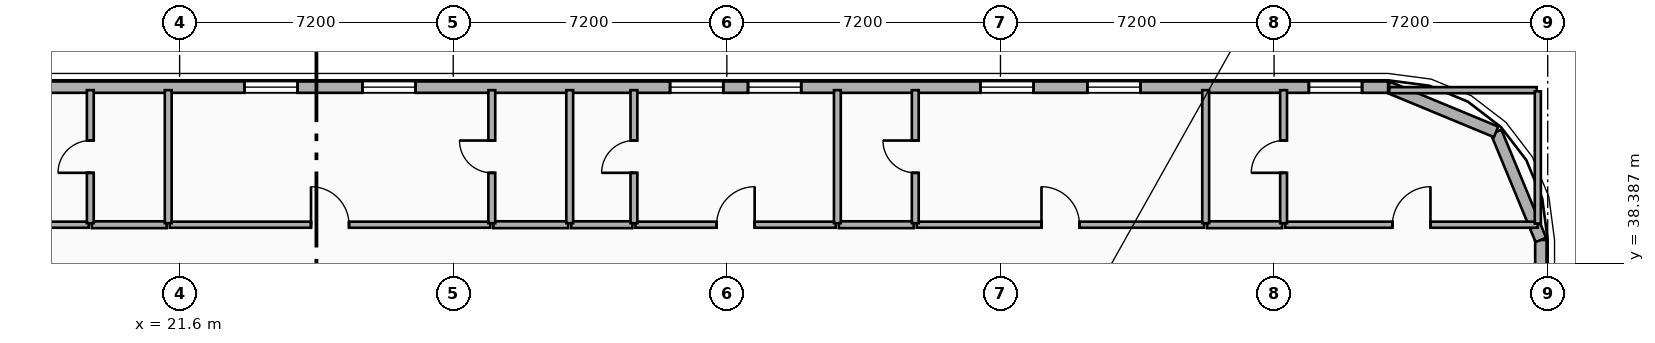
"""IFC4 building model, lengths in metres.
Left out: names, types, materials, properties, quantities, classifications, styles, units other than length and angle.
Written with IfcOpenShell. Run it as: python <this file> out.ifc"""

import sys

from ifc_helpers import new_model, si_unit, direction, frame, frame_2d, origin, place, context, subcontext, project, spatial, rectangle, extrude, element, fill, save


model = new_model("IFC4")
c1 = context("Model", 3, precision=1e-05, world=origin(), true_north=direction((0.0, 1.0)))
c2 = subcontext(c1, "Body", "Model", "MODEL_VIEW")
j1 = project(units=[si_unit("LENGTHUNIT", "METRE"), si_unit("PLANEANGLEUNIT", "RADIAN")], contexts=[c1])
p1 = place(None, origin())
s1 = spatial("IfcSite", under=j1, at=p1, CompositionType="ELEMENT")
p2 = place(p1, origin())
s2 = spatial("IfcBuilding", under=s1, at=p2, CompositionType="ELEMENT")
p3 = place(p2, frame((0.0, 0.0, 82.8)))
s3 = spatial("IfcBuildingStorey", under=s2, at=p3, CompositionType="ELEMENT", Elevation=82.8)
p4 = place(p3, frame((57.42, 39.0, 0.0), z_axis=(0.0, 0.0, 1.0), x_axis=(0.0, -1.0, 0.0)))
e1 = element("IfcWall", 1, at=p4, inside=s3, PredefinedType="SOLIDWALL", context=c2, shape_type="SweptSolid", body=[
    extrude(rectangle(XDim=18.0, YDim=0.3, at=frame_2d((9.0, 0.0))), origin(), (0.0, 0.0, 1.0), 3.24),
])
p5 = place(p4, frame((8.882, 0.0, 0.48)))
e2 = element("IfcOpeningElement", 2, at=p5, cuts=e1, PredefinedType="OPENING", context=c2, shape_type="SweptSolid", body=[
    extrude(rectangle(XDim=1.4, YDim=1.8, at=frame_2d((0.7, 0.9))), frame((0.0, 0.16, 0.0), z_axis=(0.0, -1.0, 0.0), x_axis=(1.0, 0.0, 0.0)), (0.0, 0.0, 1.0), 0.32),
])
p6 = place(p4, frame((3.621, 0.0, 0.48)))
e3 = element("IfcOpeningElement", 3, at=p6, cuts=e1, PredefinedType="OPENING", context=c2, shape_type="SweptSolid", body=[
    extrude(rectangle(XDim=1.4, YDim=1.8, at=frame_2d((0.7, 0.9))), frame((0.0, 0.16, 0.0), z_axis=(0.0, -1.0, 0.0), x_axis=(1.0, 0.0, 0.0)), (0.0, 0.0, 1.0), 0.32),
])
p7 = place(p4, frame((16.28, 0.0, 0.65)))
e4 = element("IfcOpeningElement", 4, at=p7, cuts=e1, PredefinedType="OPENING", context=c2, shape_type="SweptSolid", body=[
    extrude(rectangle(XDim=1.4, YDim=1.8, at=frame_2d((0.7, 0.9))), frame((0.0, 0.16, 0.0), z_axis=(0.0, -1.0, 0.0), x_axis=(1.0, 0.0, 0.0)), (0.0, 0.0, 1.0), 0.32),
])
p8 = place(p3, frame((56.243, 41.843, 0.0), z_axis=(0.0, 0.0, 1.0), x_axis=(0.382636798336, -0.92389884758, 0.0)))
e5 = element("IfcWall", 5, at=p8, inside=s3, PredefinedType="SOLIDWALL", context=c2, shape_type="SweptSolid", body=[
    extrude(rectangle(XDim=3.077, YDim=0.3, at=frame_2d((1.538, 0.0))), origin(), (0.0, 0.0, 1.0), 3.24),
])
p9 = place(p3, frame((53.4, 43.02, 0.0), z_axis=(0.0, 0.0, 1.0), x_axis=(0.923882414032, -0.382676475685, 0.0)))
e6 = element("IfcWall", 6, at=p9, inside=s3, PredefinedType="SOLIDWALL", context=c2, shape_type="SweptSolid", body=[
    extrude(rectangle(XDim=3.077, YDim=0.3, at=frame_2d((1.539, 0.0))), origin(), (0.0, 0.0, 1.0), 3.24),
])
p10 = place(p3, frame((4.2, 43.02, 0.0), z_axis=(0.0, 0.0, 1.0), x_axis=(1.0, 0.0, 0.0)))
e7 = element("IfcWall", 7, at=p10, inside=s3, PredefinedType="SOLIDWALL", context=c2, shape_type="SweptSolid", body=[
    extrude(rectangle(XDim=49.2, YDim=0.3, at=frame_2d((24.6, 0.0))), origin(), (0.0, 0.0, 1.0), 3.24),
])
p11 = place(p10, frame((9.09, 0.0, 0.85)))
e8 = element("IfcOpeningElement", 8, at=p11, cuts=e7, PredefinedType="OPENING", context=c2, shape_type="SweptSolid", body=[
    extrude(rectangle(XDim=1.4, YDim=1.8, at=frame_2d((0.7, 0.9))), frame((0.0, 0.16, 0.0), z_axis=(0.0, -1.0, 0.0), x_axis=(1.0, 0.0, 0.0)), (0.0, 0.0, 1.0), 0.32),
])
p12 = place(p10, frame((11.92, 0.0, 0.85)))
e9 = element("IfcOpeningElement", 9, at=p12, cuts=e7, PredefinedType="OPENING", context=c2, shape_type="SweptSolid", body=[
    extrude(rectangle(XDim=1.4, YDim=1.8, at=frame_2d((0.7, 0.9))), frame((0.0, 0.16, 0.0), z_axis=(0.0, -1.0, 0.0), x_axis=(1.0, 0.0, 0.0)), (0.0, 0.0, 1.0), 0.32),
])
p13 = place(p10, frame((19.105, 0.0, 0.85)))
e10 = element("IfcOpeningElement", 10, at=p13, cuts=e7, PredefinedType="OPENING", context=c2, shape_type="SweptSolid", body=[
    extrude(rectangle(XDim=1.4, YDim=1.8, at=frame_2d((0.7, 0.9))), frame((0.0, 0.16, 0.0), z_axis=(0.0, -1.0, 0.0), x_axis=(1.0, 0.0, 0.0)), (0.0, 0.0, 1.0), 0.32),
])
p14 = place(p10, frame((22.21, 0.0, 0.85)))
e11 = element("IfcOpeningElement", 11, at=p14, cuts=e7, PredefinedType="OPENING", context=c2, shape_type="SweptSolid", body=[
    extrude(rectangle(XDim=1.4, YDim=1.8, at=frame_2d((0.7, 0.9))), frame((0.0, 0.16, 0.0), z_axis=(0.0, -1.0, 0.0), x_axis=(1.0, 0.0, 0.0)), (0.0, 0.0, 1.0), 0.32),
])
p15 = place(p10, frame((30.306, 0.0, 0.85)))
e12 = element("IfcOpeningElement", 12, at=p15, cuts=e7, PredefinedType="OPENING", context=c2, shape_type="SweptSolid", body=[
    extrude(rectangle(XDim=1.4, YDim=1.8, at=frame_2d((0.7, 0.9))), frame((0.0, 0.16, 0.0), z_axis=(0.0, -1.0, 0.0), x_axis=(1.0, 0.0, 0.0)), (0.0, 0.0, 1.0), 0.32),
])
p16 = place(p10, frame((32.357, 0.0, 0.85)))
e13 = element("IfcOpeningElement", 13, at=p16, cuts=e7, PredefinedType="OPENING", context=c2, shape_type="SweptSolid", body=[
    extrude(rectangle(XDim=1.4, YDim=1.8, at=frame_2d((0.7, 0.9))), frame((0.0, 0.16, 0.0), z_axis=(0.0, -1.0, 0.0), x_axis=(1.0, 0.0, 0.0)), (0.0, 0.0, 1.0), 0.32),
])
p17 = place(p10, frame((38.472, 0.0, 0.85)))
e14 = element("IfcOpeningElement", 14, at=p17, cuts=e7, PredefinedType="OPENING", context=c2, shape_type="SweptSolid", body=[
    extrude(rectangle(XDim=1.4, YDim=1.8, at=frame_2d((0.7, 0.9))), frame((0.0, 0.16, 0.0), z_axis=(0.0, -1.0, 0.0), x_axis=(1.0, 0.0, 0.0)), (0.0, 0.0, 1.0), 0.32),
])
p18 = place(p10, frame((41.286, 0.0, 0.85)))
e15 = element("IfcOpeningElement", 15, at=p18, cuts=e7, PredefinedType="OPENING", context=c2, shape_type="SweptSolid", body=[
    extrude(rectangle(XDim=1.4, YDim=1.8, at=frame_2d((0.7, 0.9))), frame((0.0, 0.16, 0.0), z_axis=(0.0, -1.0, 0.0), x_axis=(1.0, 0.0, 0.0)), (0.0, 0.0, 1.0), 0.32),
])
p19 = place(p10, frame((47.115, 0.0, 0.85)))
e16 = element("IfcOpeningElement", 16, at=p19, cuts=e7, PredefinedType="OPENING", context=c2, shape_type="SweptSolid", body=[
    extrude(rectangle(XDim=1.4, YDim=1.8, at=frame_2d((0.7, 0.9))), frame((0.0, 0.16, 0.0), z_axis=(0.0, -1.0, 0.0), x_axis=(1.0, 0.0, 0.0)), (0.0, 0.0, 1.0), 0.32),
])
p20 = place(p3, frame((11.6, 39.4, 0.0), z_axis=(0.0, 0.0, 1.0), x_axis=(1.0, 0.0, 0.0)))
e17 = element("IfcWall", 17, at=p20, inside=s3, PredefinedType="PARTITIONING", context=c2, shape_type="SweptSolid", body=[
    extrude(rectangle(XDim=7.61, YDim=0.16, at=frame_2d((3.805, 0.0))), origin(), (0.0, 0.0, 1.0), 3.24),
])
p21 = place(p20, frame((3.305, 0.0, 0.0)))
e18 = element("IfcOpeningElement", 18, at=p21, cuts=e17, PredefinedType="OPENING", context=c2, shape_type="SweptSolid", body=[
    extrude(rectangle(XDim=1.0, YDim=2.15, at=frame_2d((0.5, 1.075))), frame((0.0, 0.09, 0.0), z_axis=(0.0, -1.0, 0.0), x_axis=(1.0, 0.0, 0.0)), (0.0, 0.0, 1.0), 0.18),
])
p22 = place(p3, frame((19.29, 39.4, 0.0), z_axis=(0.0, 0.0, 1.0), x_axis=(1.0, 0.0, 0.0)))
e19 = element("IfcWall", 19, at=p22, inside=s3, PredefinedType="PLUMBINGWALL", context=c2, shape_type="SweptSolid", body=[
    extrude(rectangle(XDim=1.97, YDim=0.18, at=frame_2d((0.985, 0.0))), origin(), (0.0, 0.0, 1.0), 3.24),
])
p23 = place(p3, frame((21.34, 39.4, 0.0), z_axis=(0.0, 0.0, 1.0), x_axis=(1.0, 0.0, 0.0)))
e20 = element("IfcWall", 20, at=p23, inside=s3, PredefinedType="PARTITIONING", context=c2, shape_type="SweptSolid", body=[
    extrude(rectangle(XDim=8.435, YDim=0.16, at=frame_2d((4.217, 0.0))), origin(), (0.0, 0.0, 1.0), 3.24),
])
p24 = place(p23, frame((3.718, 0.0, 0.0)))
e21 = element("IfcOpeningElement", 21, at=p24, cuts=e20, PredefinedType="OPENING", context=c2, shape_type="SweptSolid", body=[
    extrude(rectangle(XDim=1.0, YDim=2.15, at=frame_2d((0.5, 1.075))), frame((0.0, 0.09, 0.0), z_axis=(0.0, -1.0, 0.0), x_axis=(1.0, 0.0, 0.0)), (0.0, 0.0, 1.0), 0.18),
])
p25 = place(p3, frame((29.855, 39.4, 0.0), z_axis=(0.0, 0.0, 1.0), x_axis=(1.0, 0.0, 0.0)))
e22 = element("IfcWall", 22, at=p25, inside=s3, PredefinedType="PLUMBINGWALL", context=c2, shape_type="SweptSolid", body=[
    extrude(rectangle(XDim=1.97, YDim=0.18, at=frame_2d((0.985, 0.0))), origin(), (0.0, 0.0, 1.0), 3.24),
])
p26 = place(p3, frame((33.595, 39.4, 0.0), z_axis=(0.0, 0.0, 1.0), x_axis=(1.0, 0.0, 0.0)))
e23 = element("IfcWall", 23, at=p26, inside=s3, PredefinedType="PARTITIONING", context=c2, shape_type="SweptSolid", body=[
    extrude(rectangle(XDim=5.273, YDim=0.16, at=frame_2d((2.636, 0.0))), origin(), (0.0, 0.0, 1.0), 3.24),
])
p27 = place(p26, frame((2.136, 0.0, 0.0)))
e24 = element("IfcOpeningElement", 24, at=p27, cuts=e23, PredefinedType="OPENING", context=c2, shape_type="SweptSolid", body=[
    extrude(rectangle(XDim=1.0, YDim=2.15, at=frame_2d((0.5, 1.075))), frame((0.0, 0.09, 0.0), z_axis=(0.0, -1.0, 0.0), x_axis=(1.0, 0.0, 0.0)), (0.0, 0.0, 1.0), 0.18),
])
p28 = place(p3, frame((31.905, 39.4, 0.0), z_axis=(0.0, 0.0, 1.0), x_axis=(1.0, 0.0, 0.0)))
e25 = element("IfcWall", 25, at=p28, inside=s3, PredefinedType="PLUMBINGWALL", context=c2, shape_type="SweptSolid", body=[
    extrude(rectangle(XDim=1.61, YDim=0.18, at=frame_2d((0.805, 0.0))), origin(), (0.0, 0.0, 1.0), 3.24),
])
p29 = place(p3, frame((40.998, 39.4, 0.0), z_axis=(0.0, 0.0, 1.0), x_axis=(1.0, 0.0, 0.0)))
e26 = element("IfcWall", 26, at=p29, inside=s3, PredefinedType="PARTITIONING", context=c2, shape_type="SweptSolid", body=[
    extrude(rectangle(XDim=7.562, YDim=0.16, at=frame_2d((3.781, 0.0))), origin(), (0.0, 0.0, 1.0), 3.24),
])
p30 = place(p29, frame((3.281, 0.0, 0.0)))
e27 = element("IfcOpeningElement", 27, at=p30, cuts=e26, PredefinedType="OPENING", context=c2, shape_type="SweptSolid", body=[
    extrude(rectangle(XDim=1.0, YDim=2.15, at=frame_2d((0.5, 1.075))), frame((0.0, 0.09, 0.0), z_axis=(0.0, -1.0, 0.0), x_axis=(1.0, 0.0, 0.0)), (0.0, 0.0, 1.0), 0.18),
])
p31 = place(p3, frame((38.948, 39.4, 0.0), z_axis=(0.0, 0.0, 1.0), x_axis=(1.0, 0.0, 0.0)))
e28 = element("IfcWall", 28, at=p31, inside=s3, PredefinedType="PLUMBINGWALL", context=c2, shape_type="SweptSolid", body=[
    extrude(rectangle(XDim=1.97, YDim=0.18, at=frame_2d((0.985, 0.0))), origin(), (0.0, 0.0, 1.0), 3.24),
])
p32 = place(p3, frame((50.69, 39.4, 0.0), z_axis=(0.0, 0.0, 1.0), x_axis=(1.0, 0.0, 0.0)))
e29 = element("IfcWall", 29, at=p32, inside=s3, PredefinedType="PARTITIONING", context=c2, shape_type="SweptSolid", body=[
    extrude(rectangle(XDim=6.65, YDim=0.16, at=frame_2d((3.325, 0.0))), origin(), (0.0, 0.0, 1.0), 3.24),
])
p33 = place(p32, frame((2.825, 0.0, 0.0)))
e30 = element("IfcOpeningElement", 30, at=p33, cuts=e29, PredefinedType="OPENING", context=c2, shape_type="SweptSolid", body=[
    extrude(rectangle(XDim=1.0, YDim=2.15, at=frame_2d((0.5, 1.075))), frame((0.0, 0.09, 0.0), z_axis=(0.0, -1.0, 0.0), x_axis=(1.0, 0.0, 0.0)), (0.0, 0.0, 1.0), 0.18),
])
p34 = place(p3, frame((48.64, 39.4, 0.0), z_axis=(0.0, 0.0, 1.0), x_axis=(1.0, 0.0, 0.0)))
e31 = element("IfcWall", 31, at=p34, inside=s3, PredefinedType="PLUMBINGWALL", context=c2, shape_type="SweptSolid", body=[
    extrude(rectangle(XDim=1.97, YDim=0.18, at=frame_2d((0.985, 0.0))), origin(), (0.0, 0.0, 1.0), 3.24),
])
p35 = place(p3, frame((19.25, 39.44, 0.0), z_axis=(0.0, 0.0, 1.0), x_axis=(0.0, 1.0, 0.0)))
e32 = element("IfcWall", 32, at=p35, inside=s3, PredefinedType="PLUMBINGWALL", context=c2, shape_type="SweptSolid", body=[
    extrude(rectangle(XDim=3.5, YDim=0.18, at=frame_2d((1.75, 0.0))), origin(), (0.0, 0.0, 1.0), 3.24),
])
p36 = place(p35, frame((1.325, 0.0, 0.0)))
e33 = element("IfcOpeningElement", 33, at=p36, cuts=e32, PredefinedType="OPENING", context=c2, shape_type="SweptSolid", body=[
    extrude(rectangle(XDim=0.85, YDim=2.1, at=frame_2d((0.425, 1.05))), frame((0.0, 0.1, 0.0), z_axis=(0.0, -1.0, 0.0), x_axis=(1.0, 0.0, 0.0)), (0.0, 0.0, 1.0), 0.2),
])
p37 = place(p3, frame((21.3, 39.44, 0.0), z_axis=(0.0, 0.0, 1.0), x_axis=(0.0, 1.0, 0.0)))
e34 = element("IfcWall", 34, at=p37, inside=s3, PredefinedType="PLUMBINGWALL", context=c2, shape_type="SweptSolid", body=[
    extrude(rectangle(XDim=3.5, YDim=0.18, at=frame_2d((1.75, 0.0))), origin(), (0.0, 0.0, 1.0), 3.24),
])
p38 = place(p3, frame((29.815, 39.44, 0.0), z_axis=(0.0, 0.0, 1.0), x_axis=(0.0, 1.0, 0.0)))
e35 = element("IfcWall", 35, at=p38, inside=s3, PredefinedType="PLUMBINGWALL", context=c2, shape_type="SweptSolid", body=[
    extrude(rectangle(XDim=3.5, YDim=0.18, at=frame_2d((1.75, 0.0))), origin(), (0.0, 0.0, 1.0), 3.24),
])
p39 = place(p38, frame((1.325, 0.0, 0.0)))
e36 = element("IfcOpeningElement", 36, at=p39, cuts=e35, PredefinedType="OPENING", context=c2, shape_type="SweptSolid", body=[
    extrude(rectangle(XDim=0.85, YDim=2.1, at=frame_2d((0.425, 1.05))), frame((0.0, 0.1, 0.0), z_axis=(0.0, -1.0, 0.0), x_axis=(1.0, 0.0, 0.0)), (0.0, 0.0, 1.0), 0.2),
])
p40 = place(p3, frame((31.865, 39.44, 0.0), z_axis=(0.0, 0.0, 1.0), x_axis=(0.0, 1.0, 0.0)))
e37 = element("IfcWall", 37, at=p40, inside=s3, PredefinedType="PLUMBINGWALL", context=c2, shape_type="SweptSolid", body=[
    extrude(rectangle(XDim=3.5, YDim=0.18, at=frame_2d((1.75, 0.0))), origin(), (0.0, 0.0, 1.0), 3.24),
])
p41 = place(p3, frame((33.555, 39.44, 0.0), z_axis=(0.0, 0.0, 1.0), x_axis=(0.0, 1.0, 0.0)))
e38 = element("IfcWall", 38, at=p41, inside=s3, PredefinedType="PLUMBINGWALL", context=c2, shape_type="SweptSolid", body=[
    extrude(rectangle(XDim=3.5, YDim=0.18, at=frame_2d((1.75, 0.0))), origin(), (0.0, 0.0, 1.0), 3.24),
])
p42 = place(p41, frame((1.325, 0.0, 0.0)))
e39 = element("IfcOpeningElement", 39, at=p42, cuts=e38, PredefinedType="OPENING", context=c2, shape_type="SweptSolid", body=[
    extrude(rectangle(XDim=0.85, YDim=2.1, at=frame_2d((0.425, 1.05))), frame((0.0, 0.1, 0.0), z_axis=(0.0, -1.0, 0.0), x_axis=(1.0, 0.0, 0.0)), (0.0, 0.0, 1.0), 0.2),
])
p43 = place(p3, frame((38.908, 39.44, 0.0), z_axis=(0.0, 0.0, 1.0), x_axis=(0.0, 1.0, 0.0)))
e40 = element("IfcWall", 40, at=p43, inside=s3, PredefinedType="PLUMBINGWALL", context=c2, shape_type="SweptSolid", body=[
    extrude(rectangle(XDim=3.5, YDim=0.18, at=frame_2d((1.75, 0.0))), origin(), (0.0, 0.0, 1.0), 3.24),
])
p44 = place(p3, frame((40.958, 39.44, 0.0), z_axis=(0.0, 0.0, 1.0), x_axis=(0.0, 1.0, 0.0)))
e41 = element("IfcWall", 41, at=p44, inside=s3, PredefinedType="PLUMBINGWALL", context=c2, shape_type="SweptSolid", body=[
    extrude(rectangle(XDim=3.5, YDim=0.18, at=frame_2d((1.75, 0.0))), origin(), (0.0, 0.0, 1.0), 3.24),
])
p45 = place(p44, frame((1.325, 0.0, 0.0)))
e42 = element("IfcOpeningElement", 42, at=p45, cuts=e41, PredefinedType="OPENING", context=c2, shape_type="SweptSolid", body=[
    extrude(rectangle(XDim=0.85, YDim=2.1, at=frame_2d((0.425, 1.05))), frame((0.0, 0.1, 0.0), z_axis=(0.0, -1.0, 0.0), x_axis=(1.0, 0.0, 0.0)), (0.0, 0.0, 1.0), 0.2),
])
p46 = place(p3, frame((48.6, 39.44, 0.0), z_axis=(0.0, 0.0, 1.0), x_axis=(0.0, 1.0, 0.0)))
e43 = element("IfcWall", 43, at=p46, inside=s3, PredefinedType="PLUMBINGWALL", context=c2, shape_type="SweptSolid", body=[
    extrude(rectangle(XDim=3.5, YDim=0.18, at=frame_2d((1.75, 0.0))), origin(), (0.0, 0.0, 1.0), 3.24),
])
p47 = place(p3, frame((50.65, 39.44, 0.0), z_axis=(0.0, 0.0, 1.0), x_axis=(0.0, 1.0, 0.0)))
e44 = element("IfcWall", 44, at=p47, inside=s3, PredefinedType="PLUMBINGWALL", context=c2, shape_type="SweptSolid", body=[
    extrude(rectangle(XDim=3.5, YDim=0.18, at=frame_2d((1.75, 0.0))), origin(), (0.0, 0.0, 1.0), 3.24),
])
p48 = place(p47, frame((1.325, 0.0, 0.0)))
e45 = element("IfcOpeningElement", 45, at=p48, cuts=e44, PredefinedType="OPENING", context=c2, shape_type="SweptSolid", body=[
    extrude(rectangle(XDim=0.85, YDim=2.1, at=frame_2d((0.425, 1.05))), frame((0.0, 0.1, 0.0), z_axis=(0.0, -1.0, 0.0), x_axis=(1.0, 0.0, 0.0)), (0.0, 0.0, 1.0), 0.2),
])
p49 = place(p3, frame((53.43, 42.94, 0.0), z_axis=(0.0, 0.0, 1.0), x_axis=(1.0, 0.0, 0.0)))
e46 = element("IfcWall", 46, at=p49, inside=s3, PredefinedType="PARTITIONING", context=c2, shape_type="SweptSolid", body=[
    extrude(rectangle(XDim=3.88, YDim=0.16, at=frame_2d((1.94, 0.0))), origin(), (0.0, 0.0, 1.0), 3.24),
])
p50 = place(p3, frame((57.34, 39.43, 0.0), z_axis=(0.0, 0.0, 1.0), x_axis=(0.0, 1.0, 0.0)))
e47 = element("IfcWall", 47, at=p50, inside=s3, PredefinedType="PARTITIONING", context=c2, shape_type="SweptSolid", body=[
    extrude(rectangle(XDim=3.48, YDim=0.16, at=frame_2d((1.74, 0.0))), origin(), (0.0, 0.0, 1.0), 3.24),
])
p51 = place(p13, origin())
e48 = element("IfcWindow", 48, at=p51, inside=s3, PartitioningType="SINGLE_PANEL", PredefinedType="WINDOW", context=c2, shape_type="SweptSolid", body=[
    extrude(rectangle(XDim=1.4, YDim=1.8, at=frame_2d((0.7, 0.9))), frame((0.0, 0.03, 0.0), z_axis=(0.0, -1.0, 0.0), x_axis=(1.0, 0.0, 0.0)), (0.0, 0.0, 1.0), 0.06),
])
fill(e10, e48)
p52 = place(p14, origin())
e49 = element("IfcWindow", 49, at=p52, inside=s3, PartitioningType="SINGLE_PANEL", PredefinedType="WINDOW", context=c2, shape_type="SweptSolid", body=[
    extrude(rectangle(XDim=1.4, YDim=1.8, at=frame_2d((0.7, 0.9))), frame((0.0, 0.03, 0.0), z_axis=(0.0, -1.0, 0.0), x_axis=(1.0, 0.0, 0.0)), (0.0, 0.0, 1.0), 0.06),
])
fill(e11, e49)
p53 = place(p15, origin())
e50 = element("IfcWindow", 50, at=p53, inside=s3, PartitioningType="SINGLE_PANEL", PredefinedType="WINDOW", context=c2, shape_type="SweptSolid", body=[
    extrude(rectangle(XDim=1.4, YDim=1.8, at=frame_2d((0.7, 0.9))), frame((0.0, 0.03, 0.0), z_axis=(0.0, -1.0, 0.0), x_axis=(1.0, 0.0, 0.0)), (0.0, 0.0, 1.0), 0.06),
])
fill(e12, e50)
p54 = place(p16, origin())
e51 = element("IfcWindow", 51, at=p54, inside=s3, PartitioningType="SINGLE_PANEL", PredefinedType="WINDOW", context=c2, shape_type="SweptSolid", body=[
    extrude(rectangle(XDim=1.4, YDim=1.8, at=frame_2d((0.7, 0.9))), frame((0.0, 0.03, 0.0), z_axis=(0.0, -1.0, 0.0), x_axis=(1.0, 0.0, 0.0)), (0.0, 0.0, 1.0), 0.06),
])
fill(e13, e51)
p55 = place(p17, origin())
e52 = element("IfcWindow", 52, at=p55, inside=s3, PartitioningType="SINGLE_PANEL", PredefinedType="WINDOW", context=c2, shape_type="SweptSolid", body=[
    extrude(rectangle(XDim=1.4, YDim=1.8, at=frame_2d((0.7, 0.9))), frame((0.0, 0.03, 0.0), z_axis=(0.0, -1.0, 0.0), x_axis=(1.0, 0.0, 0.0)), (0.0, 0.0, 1.0), 0.06),
])
fill(e14, e52)
p56 = place(p18, origin())
e53 = element("IfcWindow", 53, at=p56, inside=s3, PartitioningType="SINGLE_PANEL", PredefinedType="WINDOW", context=c2, shape_type="SweptSolid", body=[
    extrude(rectangle(XDim=1.4, YDim=1.8, at=frame_2d((0.7, 0.9))), frame((0.0, 0.03, 0.0), z_axis=(0.0, -1.0, 0.0), x_axis=(1.0, 0.0, 0.0)), (0.0, 0.0, 1.0), 0.06),
])
fill(e15, e53)
p57 = place(p19, origin())
e54 = element("IfcWindow", 54, at=p57, inside=s3, PartitioningType="SINGLE_PANEL", PredefinedType="WINDOW", context=c2, shape_type="SweptSolid", body=[
    extrude(rectangle(XDim=1.4, YDim=1.8, at=frame_2d((0.7, 0.9))), frame((0.0, 0.03, 0.0), z_axis=(0.0, -1.0, 0.0), x_axis=(1.0, 0.0, 0.0)), (0.0, 0.0, 1.0), 0.06),
])
fill(e16, e54)
p58 = place(p24, origin())
e55 = element("IfcDoor", 55, at=p58, inside=s3, OperationType="SINGLE_SWING_LEFT", PredefinedType="DOOR", context=c2, shape_type="SweptSolid", body=[
    extrude(rectangle(XDim=1.0, YDim=2.15, at=frame_2d((0.5, 1.075))), frame((0.0, 0.025, 0.0), z_axis=(0.0, -1.0, 0.0), x_axis=(1.0, 0.0, 0.0)), (0.0, 0.0, 1.0), 0.05),
])
fill(e21, e55)
p59 = place(p27, origin())
e56 = element("IfcDoor", 56, at=p59, inside=s3, OperationType="SINGLE_SWING_RIGHT", PredefinedType="DOOR", context=c2, shape_type="SweptSolid", body=[
    extrude(rectangle(XDim=1.0, YDim=2.15, at=frame_2d((0.5, 1.075))), frame((0.0, 0.025, 0.0), z_axis=(0.0, -1.0, 0.0), x_axis=(1.0, 0.0, 0.0)), (0.0, 0.0, 1.0), 0.05),
])
fill(e24, e56)
p60 = place(p30, origin())
e57 = element("IfcDoor", 57, at=p60, inside=s3, OperationType="SINGLE_SWING_LEFT", PredefinedType="DOOR", context=c2, shape_type="SweptSolid", body=[
    extrude(rectangle(XDim=1.0, YDim=2.15, at=frame_2d((0.5, 1.075))), frame((0.0, 0.025, 0.0), z_axis=(0.0, -1.0, 0.0), x_axis=(1.0, 0.0, 0.0)), (0.0, 0.0, 1.0), 0.05),
])
fill(e27, e57)
p61 = place(p33, origin())
e58 = element("IfcDoor", 58, at=p61, inside=s3, OperationType="SINGLE_SWING_RIGHT", PredefinedType="DOOR", context=c2, shape_type="SweptSolid", body=[
    extrude(rectangle(XDim=1.0, YDim=2.15, at=frame_2d((0.5, 1.075))), frame((0.0, 0.025, 0.0), z_axis=(0.0, -1.0, 0.0), x_axis=(1.0, 0.0, 0.0)), (0.0, 0.0, 1.0), 0.05),
])
fill(e30, e58)
p62 = place(p36, origin())
e59 = element("IfcDoor", 59, at=p62, inside=s3, OperationType="SINGLE_SWING_LEFT", PredefinedType="DOOR", context=c2, shape_type="SweptSolid", body=[
    extrude(rectangle(XDim=0.85, YDim=2.1, at=frame_2d((0.425, 1.05))), frame((0.0, 0.025, 0.0), z_axis=(0.0, -1.0, 0.0), x_axis=(1.0, 0.0, 0.0)), (0.0, 0.0, 1.0), 0.05),
])
fill(e33, e59)
p63 = place(p39, origin())
e60 = element("IfcDoor", 60, at=p63, inside=s3, OperationType="SINGLE_SWING_RIGHT", PredefinedType="DOOR", context=c2, shape_type="SweptSolid", body=[
    extrude(rectangle(XDim=0.85, YDim=2.1, at=frame_2d((0.425, 1.05))), frame((0.0, 0.025, 0.0), z_axis=(0.0, -1.0, 0.0), x_axis=(1.0, 0.0, 0.0)), (0.0, 0.0, 1.0), 0.05),
])
fill(e36, e60)
p64 = place(p42, origin())
e61 = element("IfcDoor", 61, at=p64, inside=s3, OperationType="SINGLE_SWING_LEFT", PredefinedType="DOOR", context=c2, shape_type="SweptSolid", body=[
    extrude(rectangle(XDim=0.85, YDim=2.1, at=frame_2d((0.425, 1.05))), frame((0.0, 0.025, 0.0), z_axis=(0.0, -1.0, 0.0), x_axis=(1.0, 0.0, 0.0)), (0.0, 0.0, 1.0), 0.05),
])
fill(e39, e61)
p65 = place(p45, origin())
e62 = element("IfcDoor", 62, at=p65, inside=s3, OperationType="SINGLE_SWING_RIGHT", PredefinedType="DOOR", context=c2, shape_type="SweptSolid", body=[
    extrude(rectangle(XDim=0.85, YDim=2.1, at=frame_2d((0.425, 1.05))), frame((0.0, 0.025, 0.0), z_axis=(0.0, -1.0, 0.0), x_axis=(1.0, 0.0, 0.0)), (0.0, 0.0, 1.0), 0.05),
])
fill(e42, e62)
p66 = place(p48, origin())
e63 = element("IfcDoor", 63, at=p66, inside=s3, OperationType="SINGLE_SWING_LEFT", PredefinedType="DOOR", context=c2, shape_type="SweptSolid", body=[
    extrude(rectangle(XDim=0.85, YDim=2.1, at=frame_2d((0.425, 1.05))), frame((0.0, 0.025, 0.0), z_axis=(0.0, -1.0, 0.0), x_axis=(1.0, 0.0, 0.0)), (0.0, 0.0, 1.0), 0.05),
])
fill(e45, e63)
save(model, sys.argv[1])
